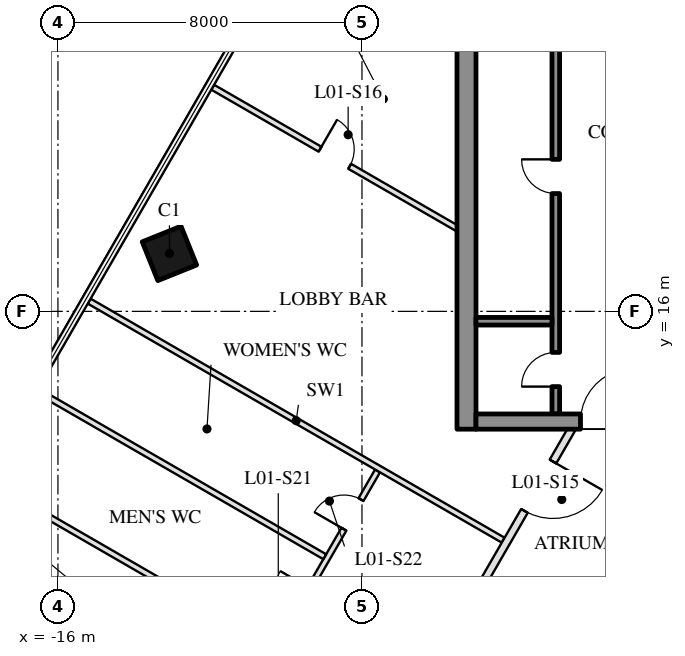
"""IFC4 building model, lengths in metres.
Left out: names, types, materials, properties, quantities, classifications, styles, units other than length and angle.
Written with IfcOpenShell. Run it as: python <this file> out.ifc"""

import sys

from ifc_helpers import new_model, si_unit, direction, frame, frame_2d, origin, origin_2d, place, context, subcontext, project, spatial, rectangle, hollow_rectangle, extrude, boolean, halfspace, element, fill, save


model = new_model("IFC4")
c1 = context("Model", 3, precision=1e-05, world=origin(), true_north=direction((0.0, 1.0)))
c2 = subcontext(c1, "Body", "Model", "MODEL_VIEW")
j1 = project(units=[si_unit("LENGTHUNIT", "METRE"), si_unit("PLANEANGLEUNIT", "RADIAN")], contexts=[c1])
p1 = place(None, origin())
s1 = spatial("IfcSite", under=j1, at=p1, CompositionType="ELEMENT")
p2 = place(p1, origin())
s2 = spatial("IfcBuilding", under=s1, at=p2, CompositionType="ELEMENT")
p3 = place(p2, frame((0.0, 0.0, 9.0)))
s3 = spatial("IfcBuildingStorey", under=s2, at=p3, CompositionType="ELEMENT", Elevation=9.0)
p4 = place(p3, frame((-13.066, 17.525, 0.0), z_axis=(0.075817777457, -0.096766445564, 0.992415195185), x_axis=(0.501683757676, 0.86383242032, 0.045901600061)))
e1 = element("IfcColumn", 1, at=p4, inside=s3, PredefinedType="COLUMN", context=c2, shape_type="SweptSolid", body=[
    boolean("DIFFERENCE", boolean("DIFFERENCE", extrude(hollow_rectangle(XDim=1.1, YDim=1.1, WallThickness=0.05, at=origin_2d()), origin(), (0.0, 0.0, 1.0), 6.55), halfspace(frame((0.0, 0.0, 0.017), z_axis=(0.0, 0.0, 1.0), x_axis=(1.0, 0.0, 0.0)), True)), halfspace(frame((0.0, 0.0, 6.534), z_axis=(0.0, 0.0, 1.0), x_axis=(1.0, 0.0, 0.0)), False)),
])
p5 = place(p3, frame((-17.388, 10.039, 0.0), z_axis=(0.098846347324, -0.057091321784, 0.993463628221), x_axis=(0.500071807692, 0.865983941567, 9.961389e-06)))
e2 = element("IfcColumn", 2, at=p5, inside=s3, PredefinedType="COLUMN", context=c2, shape_type="SweptSolid", body=[
    boolean("DIFFERENCE", boolean("DIFFERENCE", extrude(hollow_rectangle(XDim=1.1, YDim=1.1, WallThickness=0.05, at=origin_2d()), origin(), (0.0, 0.0, 1.0), 6.543), halfspace(frame((0.0, 0.0, 0.015), z_axis=(0.0, 0.0, 1.0), x_axis=(1.0, 0.0, 0.0)), True)), halfspace(frame((0.0, 0.0, 6.528), z_axis=(0.0, 0.0, 1.0), x_axis=(1.0, 0.0, 0.0)), False)),
])
p6 = place(p3, frame((-5.25, 12.9, 0.0), z_axis=(0.0, 0.0, 1.0), x_axis=(0.0, 1.0, 0.0)))
e3 = element("IfcWall", 3, at=p6, inside=s3, PredefinedType="SHEAR", context=c2, shape_type="SweptSolid", body=[
    extrude(rectangle(XDim=15.6, YDim=0.5, at=frame_2d((7.8, 0.0))), origin(), (0.0, 0.0, 1.0), 6.15),
])
p7 = place(p3, frame((-2.9, 13.3, 0.0), z_axis=(0.0, 0.0, 1.0), x_axis=(0.0, 1.0, 0.0)))
e4 = element("IfcWall", 4, at=p7, inside=s3, PredefinedType="SHEAR", context=c2, shape_type="SweptSolid", body=[
    extrude(rectangle(XDim=12.6, YDim=0.2, at=frame_2d((6.3, 0.0))), origin(), (0.0, 0.0, 1.0), 6.15),
])
p8 = place(p7, frame((0.72, 0.0, 0.0)))
e5 = element("IfcOpeningElement", 5, at=p8, cuts=e4, PredefinedType="OPENING", context=c2, shape_type="SweptSolid", body=[
    extrude(rectangle(XDim=0.9, YDim=2.1, at=frame_2d((0.45, 1.05))), frame((0.0, 0.11, 0.0), z_axis=(0.0, -1.0, 0.0), x_axis=(1.0, 0.0, 0.0)), (0.0, 0.0, 1.0), 0.22),
])
p9 = place(p7, frame((5.8, 0.0, 0.0)))
e6 = element("IfcOpeningElement", 6, at=p9, cuts=e4, PredefinedType="OPENING", context=c2, shape_type="SweptSolid", body=[
    extrude(rectangle(XDim=0.9, YDim=2.1, at=frame_2d((0.45, 1.05))), frame((0.0, 0.11, 0.0), z_axis=(0.0, -1.0, 0.0), x_axis=(1.0, 0.0, 0.0)), (0.0, 0.0, 1.0), 0.22),
])
p10 = place(p7, frame((10.51, 0.0, 0.0)))
e7 = element("IfcOpeningElement", 7, at=p10, cuts=e4, PredefinedType="OPENING", context=c2, shape_type="SweptSolid", body=[
    extrude(rectangle(XDim=0.9, YDim=2.1, at=frame_2d((0.45, 1.05))), frame((0.0, 0.11, 0.0), z_axis=(0.0, -1.0, 0.0), x_axis=(1.0, 0.0, 0.0)), (0.0, 0.0, 1.0), 0.22),
])
p11 = place(p3, frame((-3.0, 15.74, 0.0), z_axis=(0.0, 0.0, 1.0), x_axis=(-1.0, 0.0, 0.0)))
e8 = element("IfcWall", 8, at=p11, inside=s3, PredefinedType="SHEAR", context=c2, shape_type="SweptSolid", body=[
    extrude(rectangle(XDim=2.0, YDim=0.2, at=frame_2d((1.0, 0.0))), origin(), (0.0, 0.0, 1.0), 6.15),
])
p12 = place(p3, frame((2.45, 13.1, 0.0), z_axis=(0.0, 0.0, 1.0), x_axis=(-1.0, 0.0, 0.0)))
e9 = element("IfcWall", 9, at=p12, inside=s3, PredefinedType="SHEAR", context=c2, shape_type="SweptSolid", body=[
    extrude(rectangle(XDim=7.45, YDim=0.4, at=frame_2d((3.725, 0.0))), origin(), (0.0, 0.0, 1.0), 6.15),
])
p13 = place(p12, frame((1.0, 0.0, 0.0)))
e10 = element("IfcOpeningElement", 10, at=p13, cuts=e9, PredefinedType="OPENING", context=c2, shape_type="SweptSolid", body=[
    extrude(rectangle(XDim=1.1, YDim=2.1, at=frame_2d((0.55, 1.05))), frame((0.0, 0.21, 0.0), z_axis=(0.0, -1.0, 0.0), x_axis=(1.0, 0.0, 0.0)), (0.0, 0.0, 1.0), 0.42),
])
p14 = place(p12, frame((3.3, 0.0, 0.0)))
e11 = element("IfcOpeningElement", 11, at=p14, cuts=e9, PredefinedType="OPENING", context=c2, shape_type="SweptSolid", body=[
    extrude(rectangle(XDim=1.4, YDim=2.1, at=frame_2d((0.7, 1.05))), frame((0.0, 0.21, 0.0), z_axis=(0.0, -1.0, 0.0), x_axis=(1.0, 0.0, 0.0)), (0.0, 0.0, 1.0), 0.42),
])
p15 = place(p3, frame((-7.59, 11.801, 0.0), z_axis=(0.0, 0.0, 1.0), x_axis=(-0.500005920892, -0.866021985329, 0.0)))
e12 = element("IfcWall", 12, at=p15, inside=s3, PredefinedType="PARTITIONING", context=c2, shape_type="SweptSolid", body=[
    extrude(rectangle(XDim=8.325, YDim=0.15, at=frame_2d((4.163, 0.0))), origin(), (0.0, 0.0, 1.0), 5.36),
])
p16 = place(p15, frame((6.354, 0.0, 0.0)))
e13 = element("IfcOpeningElement", 13, at=p16, cuts=e12, PredefinedType="OPENING", context=c2, shape_type="SweptSolid", body=[
    extrude(rectangle(XDim=1.0, YDim=2.1, at=frame_2d((0.5, 1.05))), frame((0.0, 0.085, 0.0), z_axis=(0.0, -1.0, 0.0), x_axis=(1.0, 0.0, 0.0)), (0.0, 0.0, 1.0), 0.17),
])
p17 = place(p15, frame((3.562, 0.0, 0.0)))
e14 = element("IfcOpeningElement", 14, at=p17, cuts=e12, PredefinedType="OPENING", context=c2, shape_type="SweptSolid", body=[
    extrude(rectangle(XDim=0.9, YDim=2.1, at=frame_2d((0.45, 1.05))), frame((0.0, 0.085, 0.0), z_axis=(0.0, -1.0, 0.0), x_axis=(1.0, 0.0, 0.0)), (0.0, 0.0, 1.0), 0.17),
])
p18 = place(p15, frame((0.871, 0.0, 0.0)))
e15 = element("IfcOpeningElement", 15, at=p18, cuts=e12, PredefinedType="OPENING", context=c2, shape_type="SweptSolid", body=[
    extrude(rectangle(XDim=0.9, YDim=2.1, at=frame_2d((0.45, 1.05))), frame((0.0, 0.085, 0.0), z_axis=(0.0, -1.0, 0.0), x_axis=(1.0, 0.0, 0.0)), (0.0, 0.0, 1.0), 0.17),
])
p19 = place(p3, frame((-11.927, 21.897, 0.0), z_axis=(0.0, 0.0, 1.0), x_axis=(0.866023987038, -0.500002453868, 0.0)))
e16 = element("IfcWall", 16, at=p19, inside=s3, PredefinedType="PARTITIONING", context=c2, shape_type="SweptSolid", body=[
    extrude(rectangle(XDim=7.422, YDim=0.15, at=frame_2d((3.711, 0.0))), origin(), (0.0, 0.0, 1.0), 5.55),
])
p20 = place(p19, frame((3.261, 0.0, 0.0)))
e17 = element("IfcOpeningElement", 17, at=p20, cuts=e16, PredefinedType="OPENING", context=c2, shape_type="SweptSolid", body=[
    extrude(rectangle(XDim=0.9, YDim=2.1, at=frame_2d((0.45, 1.05))), frame((0.0, 0.085, 0.0), z_axis=(0.0, -1.0, 0.0), x_axis=(1.0, 0.0, 0.0)), (0.0, 0.0, 1.0), 0.17),
])
p21 = place(p3, frame((-15.177, 16.268, 0.0), z_axis=(0.0, 0.0, 1.0), x_axis=(0.866027204995, -0.499996880198, 0.0)))
e18 = element("IfcWall", 18, at=p21, inside=s3, PredefinedType="PARTITIONING", context=c2, shape_type="SweptSolid", body=[
    extrude(rectangle(XDim=12.578, YDim=0.15, at=frame_2d((6.289, 0.0))), origin(), (0.0, 0.0, 1.0), 5.55),
])
for number, where, z_axis, x_axis in (
    (19, (-16.54, 13.908, 0.0), (0.0, 0.0, 1.0), (0.866, -0.5, 0.0)),
    (20, (-17.903, 11.549, 0.0), (0.0, 0.0, 1.0), (0.866, -0.5, 0.0)),
):
    element("IfcWall", number, at=place(p3, frame(where, z_axis=z_axis, x_axis=x_axis)), inside=s3, PredefinedType="PARTITIONING", context=c2, shape_type="SweptSolid", body=[
        extrude(rectangle(XDim=8.73, YDim=0.15, at=frame_2d((4.365, 0.0))), origin(), (0.0, 0.0, 1.0), 5.55),
    ])
p22 = place(p3, frame((-2.482, 12.9, 0.0), z_axis=(0.0, 0.0, 1.0), x_axis=(-0.50000478328, -0.866022642139, 0.0)))
e21 = element("IfcWall", 21, at=p22, inside=s3, PredefinedType="PARTITIONING", context=c2, shape_type="SweptSolid", body=[
    extrude(rectangle(XDim=19.861, YDim=0.2, at=frame_2d((9.931, 0.0))), origin(), (0.0, 0.0, 1.0), 5.36),
])
p23 = place(p22, frame((13.23, 0.0, 0.0)))
e22 = element("IfcOpeningElement", 22, at=p23, cuts=e21, PredefinedType="OPENING", context=c2, shape_type="SweptSolid", body=[
    extrude(rectangle(XDim=1.8, YDim=2.1, at=frame_2d((0.9, 1.05))), frame((0.0, 0.11, 0.0), z_axis=(0.0, -1.0, 0.0), x_axis=(1.0, 0.0, 0.0)), (0.0, 0.0, 1.0), 0.22),
])
p24 = place(p22, frame((0.984, 0.0, 0.0)))
e23 = element("IfcOpeningElement", 23, at=p24, cuts=e21, PredefinedType="OPENING", context=c2, shape_type="SweptSolid", body=[
    extrude(rectangle(XDim=1.5, YDim=2.1, at=frame_2d((0.75, 1.05))), frame((0.0, 0.11, 0.0), z_axis=(0.0, -1.0, 0.0), x_axis=(1.0, 0.0, 0.0)), (0.0, 0.0, 1.0), 0.22),
])
p25 = place(p22, frame((16.89, 0.0, 0.0)))
e24 = element("IfcOpeningElement", 24, at=p25, cuts=e21, PredefinedType="OPENING", context=c2, shape_type="SweptSolid", body=[
    extrude(rectangle(XDim=1.8, YDim=2.4, at=frame_2d((0.9, 1.2))), frame((0.0, 0.11, 0.0), z_axis=(0.0, -1.0, 0.0), x_axis=(1.0, 0.0, 0.0)), (0.0, 0.0, 1.0), 0.22),
])
p26 = place(p22, frame((7.168, 0.0, 0.0)))
e25 = element("IfcOpeningElement", 25, at=p26, cuts=e21, PredefinedType="OPENING", context=c2, shape_type="SweptSolid", body=[
    extrude(rectangle(XDim=1.0, YDim=2.1, at=frame_2d((0.5, 1.05))), frame((0.0, 0.11, 0.0), z_axis=(0.0, -1.0, 0.0), x_axis=(1.0, 0.0, 0.0)), (0.0, 0.0, 1.0), 0.22),
])
p27 = place(p8, origin())
e26 = element("IfcDoor", 26, at=p27, inside=s3, OperationType="SINGLE_SWING_LEFT", PredefinedType="DOOR", context=c2, shape_type="SweptSolid", body=[
    extrude(rectangle(XDim=0.9, YDim=2.1, at=frame_2d((0.45, 1.05))), frame((0.0, 0.025, 0.0), z_axis=(0.0, -1.0, 0.0), x_axis=(1.0, 0.0, 0.0)), (0.0, 0.0, 1.0), 0.05),
])
fill(e5, e26)
p28 = place(p9, origin())
e27 = element("IfcDoor", 27, at=p28, inside=s3, OperationType="SINGLE_SWING_RIGHT", PredefinedType="DOOR", context=c2, shape_type="SweptSolid", body=[
    extrude(rectangle(XDim=0.9, YDim=2.1, at=frame_2d((0.45, 1.05))), frame((0.0, 0.025, 0.0), z_axis=(0.0, -1.0, 0.0), x_axis=(1.0, 0.0, 0.0)), (0.0, 0.0, 1.0), 0.05),
])
fill(e6, e27)
p29 = place(p14, frame((1.4, 0.0, 0.0), z_axis=(0.0, 0.0, 1.0), x_axis=(-1.0, 0.0, 0.0)))
e28 = element("IfcDoor", 28, at=p29, inside=s3, OperationType="DOUBLE_DOOR_SINGLE_SWING", PredefinedType="DOOR", context=c2, shape_type="SweptSolid", body=[
    extrude(rectangle(XDim=1.4, YDim=2.1, at=frame_2d((0.7, 1.05))), frame((0.0, 0.025, 0.0), z_axis=(0.0, -1.0, 0.0), x_axis=(1.0, 0.0, 0.0)), (0.0, 0.0, 1.0), 0.05),
])
fill(e11, e28)
p30 = place(p24, origin())
e29 = element("IfcDoor", 29, at=p30, inside=s3, OperationType="DOUBLE_DOOR_SINGLE_SWING", PredefinedType="DOOR", context=c2, shape_type="SweptSolid", body=[
    extrude(rectangle(XDim=1.5, YDim=2.1, at=frame_2d((0.75, 1.05))), frame((0.0, 0.025, 0.0), z_axis=(0.0, -1.0, 0.0), x_axis=(1.0, 0.0, 0.0)), (0.0, 0.0, 1.0), 0.05),
])
fill(e23, e29)
p31 = place(p20, origin())
e30 = element("IfcDoor", 30, at=p31, inside=s3, OperationType="SINGLE_SWING_LEFT", PredefinedType="DOOR", context=c2, shape_type="SweptSolid", body=[
    extrude(rectangle(XDim=0.9, YDim=2.1, at=frame_2d((0.45, 1.05))), frame((0.0, 0.025, 0.0), z_axis=(0.0, -1.0, 0.0), x_axis=(1.0, 0.0, 0.0)), (0.0, 0.0, 1.0), 0.05),
])
fill(e17, e30)
p32 = place(p18, frame((0.9, 0.0, 0.0), z_axis=(0.0, 0.0, 1.0), x_axis=(-1.0, 0.0, 0.0)))
e31 = element("IfcDoor", 31, at=p32, inside=s3, OperationType="SINGLE_SWING_LEFT", PredefinedType="DOOR", context=c2, shape_type="SweptSolid", body=[
    extrude(rectangle(XDim=0.9, YDim=2.1, at=frame_2d((0.45, 1.05))), frame((0.0, 0.025, 0.0), z_axis=(0.0, -1.0, 0.0), x_axis=(1.0, 0.0, 0.0)), (0.0, 0.0, 1.0), 0.05),
])
fill(e15, e31)
save(model, sys.argv[1])
